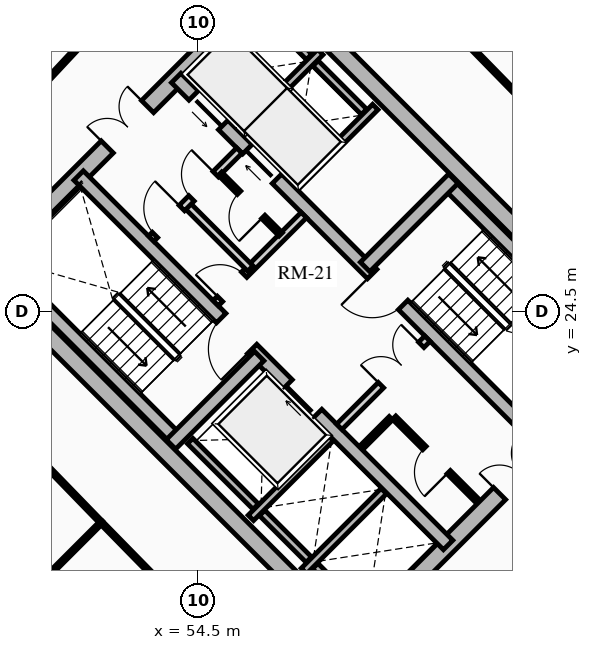
"""IFC4 building model, lengths in metres.
Left out: names, types, materials, properties, quantities, classifications, styles, units other than length and angle.
Written with IfcOpenShell. Run it as: python <this file> out.ifc"""

import sys

from ifc_helpers import new_model, si_unit, direction, frame, frame_2d, origin, place, context, subcontext, project, spatial, rectangle, extrude, source, transform, mapped, element, fill, save


model = new_model("IFC4")
c1 = context("Model", 3, precision=1e-05, world=origin(), true_north=direction((0.0, 1.0)))
c2 = subcontext(c1, "Body", "Model", "MODEL_VIEW")
j1 = project(units=[si_unit("LENGTHUNIT", "METRE"), si_unit("PLANEANGLEUNIT", "RADIAN")], contexts=[c1])
p1 = place(None, origin())
s1 = spatial("IfcSite", under=j1, at=p1, CompositionType="ELEMENT")
p2 = place(p1, origin())
s2 = spatial("IfcBuilding", under=s1, at=p2, CompositionType="ELEMENT")
p3 = place(p2, frame((0.0, 0.0, 102.16)))
s3 = spatial("IfcBuildingStorey", under=s2, at=p3, CompositionType="ELEMENT", Elevation=102.16)
for number, where, z_axis, x_axis in (
    (1, (58.737, 15.697, 0.0), (0.0, 0.0, 1.0), (-0.707, 0.707, 0.0)),
    (2, (66.303, 23.263, 0.0), (0.0, 0.0, 1.0), (-0.707, 0.707, 0.0)),
):
    element("IfcWall", number, at=place(p3, frame(where, z_axis=z_axis, x_axis=x_axis)), inside=s3, PredefinedType="SHEAR", context=c2, shape_type="SweptSolid", body=[
        extrude(rectangle(XDim=14.2, YDim=0.45, at=frame_2d((7.1, 0.0))), origin(), (0.0, 0.0, 1.0), 2.91),
    ])
p4 = place(p3, frame((58.578, 15.856, 0.0), z_axis=(0.0, 0.0, 1.0), x_axis=(0.707106781187, 0.707106781187, 0.0)))
e3 = element("IfcWall", 3, at=p4, inside=s3, PredefinedType="SHEAR", context=c2, shape_type="SweptSolid", body=[
    extrude(rectangle(XDim=10.7, YDim=0.45, at=frame_2d((5.35, 0.0))), origin(), (0.0, 0.0, 1.0), 2.91),
])
m1 = source(origin(), c2, "Body", "SweptSolid", [
    extrude(rectangle(XDim=1.5, YDim=2.02, at=frame_2d((0.75, 1.01))), frame((0.0, 0.235, 0.0), z_axis=(0.0, -1.0, 0.0), x_axis=(1.0, 0.0, 0.0)), (0.0, 0.0, 1.0), 0.47),
])
p5 = place(p4, frame((5.45, 0.0, 0.0)))
e4 = element("IfcOpeningElement", 4, at=p5, cuts=e3, PredefinedType="OPENING", context=c2, shape_type="MappedRepresentation", body=[
    mapped(m1, transform((0.0, 0.0, 0.0), x_axis=(1.0, 0.0, 0.0), y_axis=(0.0, 1.0, 0.0), z_axis=(0.0, 0.0, 1.0), scale=1.0)),
])
p6 = place(p3, frame((48.856, 25.578, 0.0), z_axis=(0.0, 0.0, 1.0), x_axis=(0.707106781187, 0.707106781187, 0.0)))
e5 = element("IfcWall", 5, at=p6, inside=s3, PredefinedType="SHEAR", context=c2, shape_type="SweptSolid", body=[
    extrude(rectangle(XDim=10.7, YDim=0.45, at=frame_2d((5.35, 0.0))), origin(), (0.0, 0.0, 1.0), 2.91),
])
p7 = place(p6, frame((4.6, 0.0, 0.0)))
e6 = element("IfcOpeningElement", 6, at=p7, cuts=e5, PredefinedType="OPENING", context=c2, shape_type="MappedRepresentation", body=[
    mapped(m1, transform((0.0, 0.0, 0.0), x_axis=(1.0, 0.0, 0.0), y_axis=(0.0, 1.0, 0.0), z_axis=(0.0, 0.0, 1.0), scale=1.0)),
])
p8 = place(p3, frame((61.078, 18.355, 0.0), z_axis=(0.0, 0.0, 1.0), x_axis=(-0.707106781187, 0.707106781187, 0.0)))
e7 = element("IfcWall", 7, at=p8, inside=s3, PredefinedType="SHEAR", context=c2, shape_type="SweptSolid", body=[
    extrude(rectangle(XDim=13.75, YDim=0.35, at=frame_2d((6.875, 0.0))), origin(), (0.0, 0.0, 1.0), 2.91),
])
m2 = source(origin(), c2, "Body", "SweptSolid", [
    extrude(rectangle(XDim=1.1, YDim=2.015, at=frame_2d((0.55, 1.007))), frame((0.0, 0.185, 0.0), z_axis=(0.0, -1.0, 0.0), x_axis=(1.0, 0.0, 0.0)), (0.0, 0.0, 1.0), 0.37),
])
p9 = place(p8, frame((4.875, 0.0, 0.0)))
e8 = element("IfcOpeningElement", 8, at=p9, cuts=e7, PredefinedType="OPENING", context=c2, shape_type="MappedRepresentation", body=[
    mapped(m2, transform((0.0, 0.0, 0.0), x_axis=(1.0, 0.0, 0.0), y_axis=(0.0, 1.0, 0.0), z_axis=(0.0, 0.0, 1.0), scale=1.0)),
])
m3 = source(origin(), c2, "Body", "SweptSolid", [
    extrude(rectangle(XDim=1.15, YDim=2.02, at=frame_2d((0.575, 1.01))), frame((0.0, 0.185, 0.0), z_axis=(0.0, -1.0, 0.0), x_axis=(1.0, 0.0, 0.0)), (0.0, 0.0, 1.0), 0.37),
])
p10 = place(p8, frame((7.295, 0.0, 0.0)))
e9 = element("IfcOpeningElement", 9, at=p10, cuts=e7, PredefinedType="OPENING", context=c2, shape_type="MappedRepresentation", body=[
    mapped(m3, transform((0.0, 0.0, 0.0), x_axis=(1.0, 0.0, 0.0), y_axis=(0.0, 1.0, 0.0), z_axis=(0.0, 0.0, 1.0), scale=1.0)),
])
p11 = place(p3, frame((63.645, 20.922, 0.0), z_axis=(0.0, 0.0, 1.0), x_axis=(-0.707106781187, 0.707106781187, 0.0)))
e10 = element("IfcWall", 10, at=p11, inside=s3, PredefinedType="SHEAR", context=c2, shape_type="SweptSolid", body=[
    extrude(rectangle(XDim=13.75, YDim=0.35, at=frame_2d((6.875, 0.0))), origin(), (0.0, 0.0, 1.0), 2.91),
])
p12 = place(p11, frame((10.0, 0.0, 0.0)))
e11 = element("IfcOpeningElement", 11, at=p12, cuts=e10, PredefinedType="OPENING", context=c2, shape_type="MappedRepresentation", body=[
    mapped(m2, transform((0.0, 0.0, 0.0), x_axis=(1.0, 0.0, 0.0), y_axis=(0.0, 1.0, 0.0), z_axis=(0.0, 0.0, 1.0), scale=1.0)),
])
p13 = place(p11, frame((12.0, 0.0, 0.0)))
e12 = element("IfcOpeningElement", 12, at=p13, cuts=e10, PredefinedType="OPENING", context=c2, shape_type="MappedRepresentation", body=[
    mapped(m2, transform((0.0, 0.0, 0.0), x_axis=(1.0, 0.0, 0.0), y_axis=(0.0, 1.0, 0.0), z_axis=(0.0, 0.0, 1.0), scale=1.0)),
])
p14 = place(p11, frame((5.305, 0.0, 0.0)))
e13 = element("IfcOpeningElement", 13, at=p14, cuts=e10, PredefinedType="OPENING", context=c2, shape_type="MappedRepresentation", body=[
    mapped(m3, transform((0.0, 0.0, 0.0), x_axis=(1.0, 0.0, 0.0), y_axis=(0.0, 1.0, 0.0), z_axis=(0.0, 0.0, 1.0), scale=1.0)),
])
p15 = place(p3, frame((53.922, 21.141, 0.0), z_axis=(0.0, 0.0, 1.0), x_axis=(-0.707088616009, 0.707124945897, 0.0)))
e14 = element("IfcWall", 14, at=p15, inside=s3, PredefinedType="SHEAR", context=c2, shape_type="SweptSolid", body=[
    extrude(rectangle(XDim=6.72, YDim=0.35, at=frame_2d((3.36, 0.0))), origin(), (0.0, 0.0, 1.0), 2.91),
])
p16 = place(p3, frame((53.784, 21.003, 0.0), z_axis=(0.0, 0.0, 1.0), x_axis=(0.707106781187, 0.707106781187, 0.0)))
e15 = element("IfcWall", 15, at=p16, inside=s3, PredefinedType="SHEAR", context=c2, shape_type="SweptSolid", body=[
    extrude(rectangle(XDim=3.285, YDim=0.35, at=frame_2d((1.643, 0.0))), origin(), (0.0, 0.0, 1.0), 2.91),
])
p17 = place(p3, frame((65.83, 23.107, 0.0), z_axis=(0.0, 0.0, 1.0), x_axis=(-0.707088616009, 0.707124945897, 0.0)))
e16 = element("IfcWall", 16, at=p17, inside=s3, PredefinedType="SHEAR", context=c2, shape_type="SweptSolid", body=[
    extrude(rectangle(XDim=6.72, YDim=0.35, at=frame_2d((3.36, 0.0))), origin(), (0.0, 0.0, 1.0), 2.91),
])
p18 = place(p3, frame((58.893, 25.674, 0.0), z_axis=(0.0, 0.0, 1.0), x_axis=(0.707106781187, 0.707106781187, 0.0)))
e17 = element("IfcWall", 17, at=p18, inside=s3, PredefinedType="SHEAR", context=c2, shape_type="SweptSolid", body=[
    extrude(rectangle(XDim=3.285, YDim=0.35, at=frame_2d((1.643, 0.0))), origin(), (0.0, 0.0, 1.0), 2.91),
])
p19 = place(p3, frame((55.888, 19.069, 0.0), z_axis=(0.0, 0.0, 1.0), x_axis=(0.707106781187, 0.707106781187, 0.0)))
e18 = element("IfcWall", 18, at=p19, inside=s3, PredefinedType="SHEAR", context=c2, shape_type="SweptSolid", body=[
    extrude(rectangle(XDim=2.97, YDim=0.2, at=frame_2d((1.485, 0.0))), origin(), (0.0, 0.0, 1.0), 2.91),
])
p20 = place(p3, frame((56.015, 19.366, 0.0), z_axis=(0.0, 0.0, 1.0), x_axis=(-0.707106781187, 0.707106781187, 0.0)))
e19 = element("IfcWall", 19, at=p20, inside=s3, PredefinedType="SHEAR", context=c2, shape_type="SweptSolid", body=[
    extrude(rectangle(XDim=2.44, YDim=0.2, at=frame_2d((1.22, 0.0))), origin(), (0.0, 0.0, 1.0), 2.91),
])
p21 = place(p3, frame((57.284, 17.673, 0.0), z_axis=(0.0, 0.0, 1.0), x_axis=(0.707147878904, 0.70706568108, 0.0)))
e20 = element("IfcWall", 20, at=p21, inside=s3, PredefinedType="SHEAR", context=c2, shape_type="SweptSolid", body=[
    extrude(rectangle(XDim=2.97, YDim=0.2, at=frame_2d((1.485, 0.0))), origin(), (0.0, 0.0, 1.0), 2.91),
])
p22 = place(p3, frame((57.412, 17.97, 0.0), z_axis=(0.0, 0.0, 1.0), x_axis=(-0.707106781187, 0.707106781187, 0.0)))
e21 = element("IfcWall", 21, at=p22, inside=s3, PredefinedType="SHEAR", context=c2, shape_type="SweptSolid", body=[
    extrude(rectangle(XDim=1.735, YDim=0.2, at=frame_2d((0.867, 0.0))), origin(), (0.0, 0.0, 1.0), 2.91),
])
p23 = place(p3, frame((58.737, 16.644, 0.0), z_axis=(0.0, 0.0, 1.0), x_axis=(-0.707032117043, 0.707181437447, 0.0)))
e22 = element("IfcWall", 22, at=p23, inside=s3, PredefinedType="SHEAR", context=c2, shape_type="SweptSolid", body=[
    extrude(rectangle(XDim=1.635, YDim=0.2, at=frame_2d((0.817, 0.0))), origin(), (0.0, 0.0, 1.0), 2.91),
])
p24 = place(p3, frame((57.062, 27.781, 0.0), z_axis=(0.0, 0.0, 1.0), x_axis=(0.707106781187, 0.707106781187, 0.0)))
e23 = element("IfcWall", 23, at=p24, inside=s3, PredefinedType="SHEAR", context=c2, shape_type="SweptSolid", body=[
    extrude(rectangle(XDim=2.97, YDim=0.2, at=frame_2d((1.485, 0.0))), origin(), (0.0, 0.0, 1.0), 2.91),
])
p25 = place(p3, frame((55.615, 29.227, 0.0), z_axis=(0.0, 0.0, 1.0), x_axis=(0.707147878904, 0.70706568108, 0.0)))
e24 = element("IfcWall", 24, at=p25, inside=s3, PredefinedType="SHEAR", context=c2, shape_type="SweptSolid", body=[
    extrude(rectangle(XDim=2.97, YDim=0.2, at=frame_2d((1.485, 0.0))), origin(), (0.0, 0.0, 1.0), 2.91),
])
p26 = place(p3, frame((58.865, 29.754, 0.0), z_axis=(0.0, 0.0, 1.0), x_axis=(-0.707174411312, 0.707039144592, 0.0)))
e25 = element("IfcWall", 25, at=p26, inside=s3, PredefinedType="SHEAR", context=c2, shape_type="SweptSolid", body=[
    extrude(rectangle(XDim=1.805, YDim=0.2, at=frame_2d((0.902, 0.0))), origin(), (0.0, 0.0, 1.0), 2.91),
])
p27 = place(p3, frame((57.419, 31.2, 0.0), z_axis=(0.0, 0.0, 1.0), x_axis=(-0.707032117043, 0.707181437447, 0.0)))
e26 = element("IfcWall", 26, at=p27, inside=s3, PredefinedType="SHEAR", context=c2, shape_type="SweptSolid", body=[
    extrude(rectangle(XDim=1.635, YDim=0.2, at=frame_2d((0.817, 0.0))), origin(), (0.0, 0.0, 1.0), 2.91),
])
p28 = place(p3, frame((58.214, 21.467, 0.0), z_axis=(0.0, 0.0, 1.0), x_axis=(0.707106781187, 0.707106781187, 0.0)))
e27 = element("IfcWall", 27, at=p28, inside=s3, PredefinedType="PARTITIONING", context=c2, shape_type="SweptSolid", body=[
    extrude(rectangle(XDim=3.28, YDim=0.2, at=frame_2d((1.64, 0.0))), origin(), (0.0, 0.0, 1.0), 2.655),
])
m4 = source(origin(), c2, "Body", "SweptSolid", [
    extrude(rectangle(XDim=1.5, YDim=2.02, at=frame_2d((0.75, 1.01))), frame((0.0, 0.11, 0.0), z_axis=(0.0, -1.0, 0.0), x_axis=(1.0, 0.0, 0.0)), (0.0, 0.0, 1.0), 0.22),
])
p29 = place(p28, frame((1.55, 0.0, 0.0)))
e28 = element("IfcOpeningElement", 28, at=p29, cuts=e27, PredefinedType="OPENING", context=c2, shape_type="MappedRepresentation", body=[
    mapped(m4, transform((0.0, 0.0, 0.0), x_axis=(1.0, 0.0, 0.0), y_axis=(0.0, 1.0, 0.0), z_axis=(0.0, 0.0, 1.0), scale=1.0)),
])
p30 = place(p3, frame((54.961, 24.719, 0.0), z_axis=(0.0, 0.0, 1.0), x_axis=(0.707106781187, 0.707106781187, 0.0)))
e29 = element("IfcWall", 29, at=p30, inside=s3, PredefinedType="PARTITIONING", context=c2, shape_type="SweptSolid", body=[
    extrude(rectangle(XDim=3.28, YDim=0.2, at=frame_2d((1.64, 0.0))), origin(), (0.0, 0.0, 1.0), 2.655),
])
m5 = source(origin(), c2, "Body", "SweptSolid", [
    extrude(rectangle(XDim=0.9, YDim=2.005, at=frame_2d((0.45, 1.002))), frame((0.0, 0.11, 0.0), z_axis=(0.0, -1.0, 0.0), x_axis=(1.0, 0.0, 0.0)), (0.0, 0.0, 1.0), 0.22),
])
p31 = place(p30, frame((0.16, 0.0, 0.0)))
e30 = element("IfcOpeningElement", 30, at=p31, cuts=e29, PredefinedType="OPENING", context=c2, shape_type="MappedRepresentation", body=[
    mapped(m5, transform((0.0, 0.0, 0.0), x_axis=(1.0, 0.0, 0.0), y_axis=(0.0, 1.0, 0.0), z_axis=(0.0, 0.0, 1.0), scale=1.0)),
])
p32 = place(p3, frame((55.874, 25.631, 0.0), z_axis=(0.0, 0.0, 1.0), x_axis=(-0.707157639372, 0.707055919343, 0.0)))
e31 = element("IfcWall", 31, at=p32, inside=s3, PredefinedType="PARTITIONING", context=c2, shape_type="SweptSolid", body=[
    extrude(rectangle(XDim=2.4, YDim=0.2, at=frame_2d((1.2, 0.0))), origin(), (0.0, 0.0, 1.0), 2.655),
])
p33 = place(p3, frame((53.264, 26.416, 0.0), z_axis=(0.0, 0.0, 1.0), x_axis=(0.707106781187, 0.707106781187, 0.0)))
e32 = element("IfcWall", 32, at=p33, inside=s3, PredefinedType="PARTITIONING", context=c2, shape_type="SweptSolid", body=[
    extrude(rectangle(XDim=3.28, YDim=0.2, at=frame_2d((1.64, 0.0))), origin(), (0.0, 0.0, 1.0), 2.655),
])
m6 = source(origin(), c2, "Body", "SweptSolid", [
    extrude(rectangle(XDim=1.0, YDim=2.015, at=frame_2d((0.5, 1.007))), frame((0.0, 0.11, 0.0), z_axis=(0.0, -1.0, 0.0), x_axis=(1.0, 0.0, 0.0)), (0.0, 0.0, 1.0), 0.22),
])
p34 = place(p33, frame((0.14, 0.0, 0.0)))
e33 = element("IfcOpeningElement", 33, at=p34, cuts=e32, PredefinedType="OPENING", context=c2, shape_type="MappedRepresentation", body=[
    mapped(m6, transform((0.0, 0.0, 0.0), x_axis=(1.0, 0.0, 0.0), y_axis=(0.0, 1.0, 0.0), z_axis=(0.0, 0.0, 1.0), scale=1.0)),
])
p35 = place(p33, frame((1.5, 0.0, 0.0)))
e34 = element("IfcOpeningElement", 34, at=p35, cuts=e32, PredefinedType="OPENING", context=c2, shape_type="MappedRepresentation", body=[
    mapped(m5, transform((0.0, 0.0, 0.0), x_axis=(1.0, 0.0, 0.0), y_axis=(0.0, 1.0, 0.0), z_axis=(0.0, 0.0, 1.0), scale=1.0)),
])
p36 = place(p3, frame((61.835, 19.529, 0.0), z_axis=(0.0, 0.0, 1.0), x_axis=(-0.707146413884, 0.707067146267, 0.0)))
e35 = element("IfcWall", 35, at=p36, inside=s3, PredefinedType="PARTITIONING", context=c2, shape_type="SweptSolid", body=[
    extrude(rectangle(XDim=3.08, YDim=0.125, at=frame_2d((1.54, 0.0))), origin(), (0.0, 0.0, 1.0), 2.655),
])
m7 = source(origin(), c2, "Body", "SweptSolid", [
    extrude(rectangle(XDim=0.9, YDim=2.005, at=frame_2d((0.45, 1.002))), frame((0.0, 0.073, 0.0), z_axis=(0.0, -1.0, 0.0), x_axis=(1.0, 0.0, 0.0)), (0.0, 0.0, 1.0), 0.145),
])
p37 = place(p36, frame((1.05, 0.0, 0.0)))
e36 = element("IfcOpeningElement", 36, at=p37, cuts=e35, PredefinedType="OPENING", context=c2, shape_type="MappedRepresentation", body=[
    mapped(m7, transform((0.0, 0.0, 0.0), x_axis=(1.0, 0.0, 0.0), y_axis=(0.0, 1.0, 0.0), z_axis=(0.0, 0.0, 1.0), scale=1.0)),
])
p38 = place(p3, frame((58.794, 20.915, 0.0), z_axis=(0.0, 0.0, 1.0), x_axis=(0.707106781187, 0.707106781187, 0.0)))
e37 = element("IfcWall", 37, at=p38, inside=s3, PredefinedType="PARTITIONING", context=c2, shape_type="SweptSolid", body=[
    extrude(rectangle(XDim=1.1, YDim=0.125, at=frame_2d((0.55, 0.0))), origin(), (0.0, 0.0, 1.0), 2.655),
])
p39 = place(p3, frame((56.673, 26.529, 0.0), z_axis=(0.0, 0.0, 1.0), x_axis=(-0.707052764397, 0.70716079385, 0.0)))
e38 = element("IfcWall", 38, at=p39, inside=s3, PredefinedType="PARTITIONING", context=c2, shape_type="SweptSolid", body=[
    extrude(rectangle(XDim=2.26, YDim=0.125, at=frame_2d((1.13, 0.0))), origin(), (0.0, 0.0, 1.0), 2.655),
])
p40 = place(p39, frame((0.65, 0.0, 0.0)))
e39 = element("IfcOpeningElement", 39, at=p40, cuts=e38, PredefinedType="OPENING", context=c2, shape_type="MappedRepresentation", body=[
    mapped(m7, transform((0.0, 0.0, 0.0), x_axis=(1.0, 0.0, 0.0), y_axis=(0.0, 1.0, 0.0), z_axis=(0.0, 0.0, 1.0), scale=1.0)),
])
p41 = place(p3, frame((63.051, 30.051, 0.0), z_axis=(0.0, 0.0, 1.0), x_axis=(-0.698911483116, 0.715208178622, 0.0)))
e40 = element("IfcWall", 40, at=p41, inside=s3, PredefinedType="MOVABLE", context=c2, shape_type="SweptSolid", body=[
    extrude(rectangle(XDim=6.082, YDim=0.1, at=frame_2d((3.041, 0.0))), origin(), (0.0, 0.0, 1.0), 2.225),
])
p42 = place(p3, frame((52.072, 32.237, 0.0), z_axis=(0.0, 0.0, 1.0), x_axis=(-0.682528774423, -0.730858722383, 0.0)))
e41 = element("IfcWall", 41, at=p42, inside=s3, PredefinedType="MOVABLE", context=c2, shape_type="SweptSolid", body=[
    extrude(rectangle(XDim=6.486, YDim=0.1, at=frame_2d((3.243, 0.0))), origin(), (0.0, 0.0, 1.0), 2.225),
])
p43 = place(p3, frame((47.763, 23.265, 0.0), z_axis=(0.0, 0.0, 1.0), x_axis=(0.696243493404, -0.717805682544, 0.0)))
e42 = element("IfcWall", 42, at=p43, inside=s3, PredefinedType="MOVABLE", context=c2, shape_type="SweptSolid", body=[
    extrude(rectangle(XDim=6.012, YDim=0.1, at=frame_2d((3.006, 0.0))), origin(), (0.0, 0.0, 1.0), 2.655),
])
m8 = source(origin(), c2, "Body", "SweptSolid", [
    extrude(rectangle(XDim=1.05, YDim=2.015, at=frame_2d((0.525, 1.007))), frame((0.0, 0.06, 0.0), z_axis=(0.0, -1.0, 0.0), x_axis=(1.0, 0.0, 0.0)), (0.0, 0.0, 1.0), 0.12),
])
p44 = place(p43, frame((2.481, 0.0, 0.0)))
e43 = element("IfcOpeningElement", 43, at=p44, cuts=e42, PredefinedType="OPENING", context=c2, shape_type="MappedRepresentation", body=[
    mapped(m8, transform((0.0, 0.0, 0.0), x_axis=(1.0, 0.0, 0.0), y_axis=(0.0, 1.0, 0.0), z_axis=(0.0, 0.0, 1.0), scale=1.0)),
])
p45 = place(p3, frame((51.949, 18.949, 0.0), z_axis=(0.0, 0.0, 1.0), x_axis=(0.699840807936, -0.714298847506, 0.0)))
e44 = element("IfcWall", 44, at=p45, inside=s3, PredefinedType="MOVABLE", context=c2, shape_type="SweptSolid", body=[
    extrude(rectangle(XDim=6.13, YDim=0.1, at=frame_2d((3.065, 0.0))), origin(), (0.0, 0.0, 1.0), 2.225),
])
p46 = place(p3, frame((51.949, 18.949, 0.0), z_axis=(0.0, 0.0, 1.0), x_axis=(-0.707106781187, -0.707106781187, 0.0)))
e45 = element("IfcWall", 45, at=p46, inside=s3, PredefinedType="MOVABLE", context=c2, shape_type="SweptSolid", body=[
    extrude(rectangle(XDim=7.711, YDim=0.1, at=frame_2d((3.855, 0.0))), origin(), (0.0, 0.0, 1.0), 2.179),
])
m9 = source(origin(), c2, "Body", "SweptSolid", [
    extrude(rectangle(XDim=1.1, YDim=2.015, at=frame_2d((0.55, 1.007))), frame((0.0, 0.025, 0.0), z_axis=(0.0, -1.0, 0.0), x_axis=(1.0, 0.0, 0.0)), (0.0, 0.0, 1.0), 0.05),
])
p47 = place(p9, origin())
e46 = element("IfcDoor", 46, at=p47, inside=s3, OperationType="SLIDING_TO_RIGHT", PredefinedType="DOOR", context=c2, shape_type="MappedRepresentation", body=[
    mapped(m9, transform((0.0, 0.0, 0.0), x_axis=(1.0, 0.0, 0.0), y_axis=(0.0, 1.0, 0.0), z_axis=(0.0, 0.0, 1.0), scale=1.0)),
])
fill(e8, e46)
p48 = place(p12, origin())
e47 = element("IfcDoor", 47, at=p48, inside=s3, OperationType="SLIDING_TO_RIGHT", PredefinedType="DOOR", context=c2, shape_type="MappedRepresentation", body=[
    mapped(m9, transform((0.0, 0.0, 0.0), x_axis=(1.0, 0.0, 0.0), y_axis=(0.0, 1.0, 0.0), z_axis=(0.0, 0.0, 1.0), scale=1.0)),
])
fill(e11, e47)
p49 = place(p13, origin())
e48 = element("IfcDoor", 48, at=p49, inside=s3, OperationType="SLIDING_TO_LEFT", PredefinedType="DOOR", context=c2, shape_type="MappedRepresentation", body=[
    mapped(m9, transform((0.0, 0.0, 0.0), x_axis=(1.0, 0.0, 0.0), y_axis=(0.0, 1.0, 0.0), z_axis=(0.0, 0.0, 1.0), scale=1.0)),
])
fill(e12, e48)
m10 = source(origin(), c2, "Body", "SweptSolid", [
    extrude(rectangle(XDim=1.15, YDim=2.02, at=frame_2d((0.575, 1.01))), frame((0.0, 0.025, 0.0), z_axis=(0.0, -1.0, 0.0), x_axis=(1.0, 0.0, 0.0)), (0.0, 0.0, 1.0), 0.05),
])
p50 = place(p10, origin())
e49 = element("IfcDoor", 49, at=p50, inside=s3, OperationType="SINGLE_SWING_LEFT", PredefinedType="DOOR", context=c2, shape_type="MappedRepresentation", body=[
    mapped(m10, transform((0.0, 0.0, 0.0), x_axis=(1.0, 0.0, 0.0), y_axis=(0.0, 1.0, 0.0), z_axis=(0.0, 0.0, 1.0), scale=1.0)),
])
fill(e9, e49)
p51 = place(p14, origin())
e50 = element("IfcDoor", 50, at=p51, inside=s3, OperationType="SINGLE_SWING_RIGHT", PredefinedType="DOOR", context=c2, shape_type="MappedRepresentation", body=[
    mapped(m10, transform((0.0, 0.0, 0.0), x_axis=(1.0, 0.0, 0.0), y_axis=(0.0, 1.0, 0.0), z_axis=(0.0, 0.0, 1.0), scale=1.0)),
])
fill(e13, e50)
m11 = source(origin(), c2, "Body", "SweptSolid", [
    extrude(rectangle(XDim=1.5, YDim=2.02, at=frame_2d((0.75, 1.01))), frame((0.0, 0.025, 0.0), z_axis=(0.0, -1.0, 0.0), x_axis=(1.0, 0.0, 0.0)), (0.0, 0.0, 1.0), 0.05),
])
p52 = place(p7, origin())
e51 = element("IfcDoor", 51, at=p52, inside=s3, OperationType="DOUBLE_DOOR_SINGLE_SWING", PredefinedType="DOOR", context=c2, shape_type="MappedRepresentation", body=[
    mapped(m11, transform((0.0, 0.0, 0.0), x_axis=(1.0, 0.0, 0.0), y_axis=(0.0, 1.0, 0.0), z_axis=(0.0, 0.0, 1.0), scale=1.0)),
])
fill(e6, e51)
p53 = place(p5, origin())
e52 = element("IfcDoor", 52, at=p53, inside=s3, OperationType="DOUBLE_DOOR_SINGLE_SWING", PredefinedType="DOOR", context=c2, shape_type="MappedRepresentation", body=[
    mapped(m11, transform((0.0, 0.0, 0.0), x_axis=(1.0, 0.0, 0.0), y_axis=(0.0, 1.0, 0.0), z_axis=(0.0, 0.0, 1.0), scale=1.0)),
])
fill(e4, e52)
p54 = place(p29, origin())
e53 = element("IfcDoor", 53, at=p54, inside=s3, OperationType="DOUBLE_DOOR_SINGLE_SWING", PredefinedType="DOOR", context=c2, shape_type="MappedRepresentation", body=[
    mapped(m11, transform((0.0, 0.0, 0.0), x_axis=(1.0, 0.0, 0.0), y_axis=(0.0, 1.0, 0.0), z_axis=(0.0, 0.0, 1.0), scale=1.0)),
])
fill(e28, e53)
m12 = source(origin(), c2, "Body", "SweptSolid", [
    extrude(rectangle(XDim=0.9, YDim=2.005, at=frame_2d((0.45, 1.002))), frame((0.0, 0.025, 0.0), z_axis=(0.0, -1.0, 0.0), x_axis=(1.0, 0.0, 0.0)), (0.0, 0.0, 1.0), 0.05),
])
p55 = place(p31, origin())
e54 = element("IfcDoor", 54, at=p55, inside=s3, OperationType="SINGLE_SWING_LEFT", PredefinedType="DOOR", context=c2, shape_type="MappedRepresentation", body=[
    mapped(m12, transform((0.0, 0.0, 0.0), x_axis=(1.0, 0.0, 0.0), y_axis=(0.0, 1.0, 0.0), z_axis=(0.0, 0.0, 1.0), scale=1.0)),
])
fill(e30, e54)
m13 = source(origin(), c2, "Body", "SweptSolid", [
    extrude(rectangle(XDim=1.0, YDim=2.015, at=frame_2d((0.5, 1.007))), frame((0.0, 0.025, 0.0), z_axis=(0.0, -1.0, 0.0), x_axis=(1.0, 0.0, 0.0)), (0.0, 0.0, 1.0), 0.05),
])
p56 = place(p34, origin())
e55 = element("IfcDoor", 55, at=p56, inside=s3, OperationType="SINGLE_SWING_RIGHT", PredefinedType="DOOR", context=c2, shape_type="MappedRepresentation", body=[
    mapped(m13, transform((0.0, 0.0, 0.0), x_axis=(1.0, 0.0, 0.0), y_axis=(0.0, 1.0, 0.0), z_axis=(0.0, 0.0, 1.0), scale=1.0)),
])
fill(e33, e55)
p57 = place(p37, origin())
e56 = element("IfcDoor", 56, at=p57, inside=s3, OperationType="SINGLE_SWING_LEFT", PredefinedType="DOOR", context=c2, shape_type="MappedRepresentation", body=[
    mapped(m12, transform((0.0, 0.0, 0.0), x_axis=(1.0, 0.0, 0.0), y_axis=(0.0, 1.0, 0.0), z_axis=(0.0, 0.0, 1.0), scale=1.0)),
])
fill(e36, e56)
p58 = place(p35, origin())
e57 = element("IfcDoor", 57, at=p58, inside=s3, OperationType="SINGLE_SWING_RIGHT", PredefinedType="DOOR", context=c2, shape_type="MappedRepresentation", body=[
    mapped(m12, transform((0.0, 0.0, 0.0), x_axis=(1.0, 0.0, 0.0), y_axis=(0.0, 1.0, 0.0), z_axis=(0.0, 0.0, 1.0), scale=1.0)),
])
fill(e34, e57)
p59 = place(p40, origin())
e58 = element("IfcDoor", 58, at=p59, inside=s3, OperationType="SINGLE_SWING_LEFT", PredefinedType="DOOR", context=c2, shape_type="MappedRepresentation", body=[
    mapped(m12, transform((0.0, 0.0, 0.0), x_axis=(1.0, 0.0, 0.0), y_axis=(0.0, 1.0, 0.0), z_axis=(0.0, 0.0, 1.0), scale=1.0)),
])
fill(e39, e58)
save(model, sys.argv[1])
